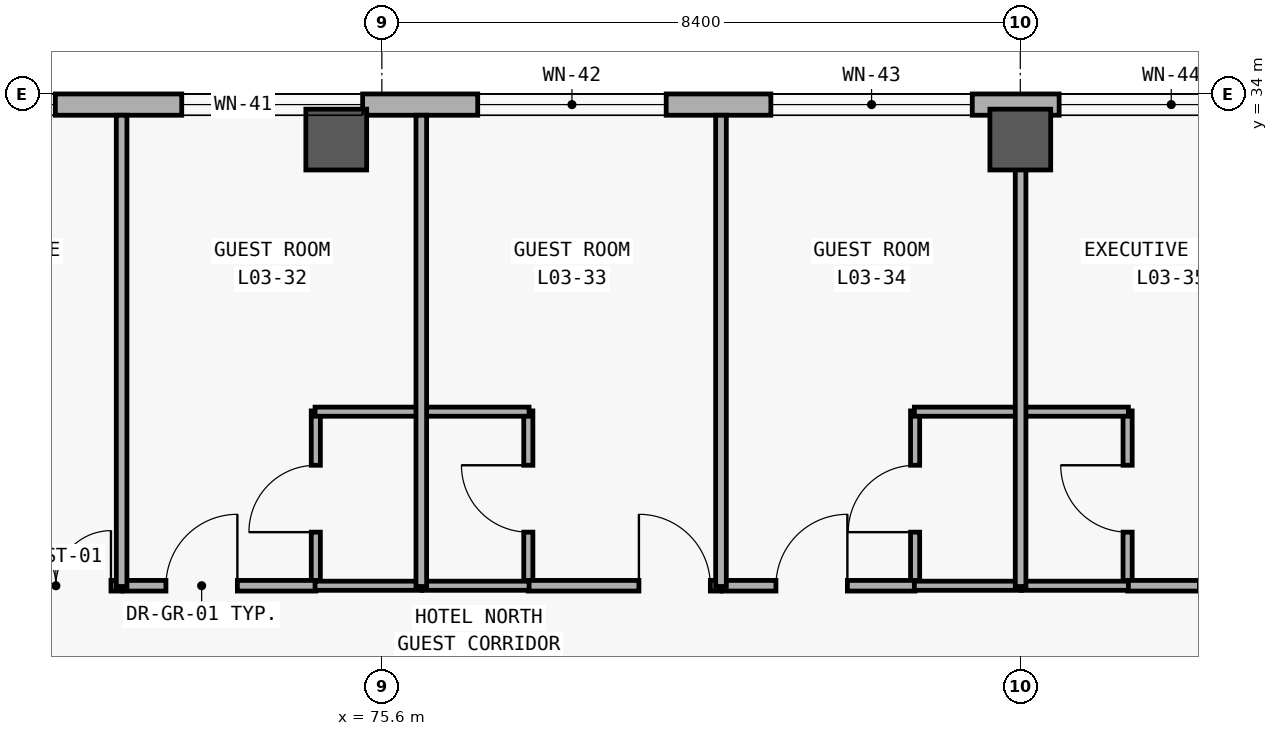
"""IFC4 building model, lengths in metres.
Left out: names, types, materials, properties, quantities, classifications, styles, units other than length and angle.
Written with IfcOpenShell. Run it as: python <this file> out.ifc"""

import sys

from ifc_helpers import new_model, si_unit, direction, frame, frame_2d, origin, origin_2d, place, context, subcontext, project, spatial, rectangle, extrude, element, fill, save


model = new_model("IFC4")
c1 = context("Model", 3, precision=1e-05, world=origin(), true_north=direction((0.0, 1.0)))
c2 = subcontext(c1, "Body", "Model", "MODEL_VIEW")
j1 = project(units=[si_unit("LENGTHUNIT", "METRE"), si_unit("PLANEANGLEUNIT", "RADIAN")], contexts=[c1])
p1 = place(None, origin())
s1 = spatial("IfcSite", under=j1, at=p1, CompositionType="ELEMENT")
p2 = place(p1, origin())
s2 = spatial("IfcBuilding", under=s1, at=p2, CompositionType="ELEMENT")
p3 = place(p2, frame((0.0, 0.0, 15.0)))
s3 = spatial("IfcBuildingStorey", under=s2, at=p3, CompositionType="ELEMENT", Elevation=15.0)
for number, where, z_axis, x_axis in (
    (1, (75.0, 33.4, 0.0), (0.0, 0.0, 1.0), (1.0, 0.0, 0.0)),
    (2, (84.0, 33.4, 0.0), (0.0, 0.0, 1.0), (1.0, 0.0, 0.0)),
):
    element("IfcColumn", number, at=place(p3, frame(where, z_axis=z_axis, x_axis=x_axis)), inside=s3, PredefinedType="COLUMN", context=c2, shape_type="SweptSolid", body=[
        extrude(rectangle(XDim=0.8, YDim=0.8, at=origin_2d()), origin(), (0.0, 0.0, 1.0), 4.2),
    ])
p4 = place(p3, frame((8.68, 33.86, 0.0), z_axis=(0.0, 0.0, 1.0), x_axis=(1.0, 0.0, 0.0)))
e3 = element("IfcWall", 3, at=p4, inside=s3, PredefinedType="SOLIDWALL", context=c2, shape_type="SweptSolid", body=[
    extrude(rectangle(XDim=83.44, YDim=0.28, at=frame_2d((41.72, 0.0))), origin(), (0.0, 0.0, 1.0), 3.92),
])
p5 = place(p4, frame((4.895, 0.0, 0.85)))
e4 = element("IfcOpeningElement", 4, at=p5, cuts=e3, PredefinedType="OPENING", context=c2, shape_type="SweptSolid", body=[
    extrude(rectangle(XDim=2.6, YDim=2.2, at=frame_2d((1.3, 1.1))), frame((0.0, 0.15, 0.0), z_axis=(0.0, -1.0, 0.0), x_axis=(1.0, 0.0, 0.0)), (0.0, 0.0, 1.0), 0.3),
])
p6 = place(p4, frame((13.371, 0.0, 0.85)))
e5 = element("IfcOpeningElement", 5, at=p6, cuts=e3, PredefinedType="OPENING", context=c2, shape_type="SweptSolid", body=[
    extrude(rectangle(XDim=1.7, YDim=2.0, at=frame_2d((0.85, 1.0))), frame((0.0, 0.15, 0.0), z_axis=(0.0, -1.0, 0.0), x_axis=(1.0, 0.0, 0.0)), (0.0, 0.0, 1.0), 0.3),
])
p7 = place(p4, frame((17.015, 0.0, 0.85)))
e6 = element("IfcOpeningElement", 6, at=p7, cuts=e3, PredefinedType="OPENING", context=c2, shape_type="SweptSolid", body=[
    extrude(rectangle(XDim=2.3, YDim=2.05, at=frame_2d((1.15, 1.025))), frame((0.0, 0.15, 0.0), z_axis=(0.0, -1.0, 0.0), x_axis=(1.0, 0.0, 0.0)), (0.0, 0.0, 1.0), 0.3),
])
p8 = place(p4, frame((20.732, 0.0, 0.85)))
e7 = element("IfcOpeningElement", 7, at=p8, cuts=e3, PredefinedType="OPENING", context=c2, shape_type="SweptSolid", body=[
    extrude(rectangle(XDim=2.75, YDim=2.1, at=frame_2d((1.375, 1.05))), frame((0.0, 0.15, 0.0), z_axis=(0.0, -1.0, 0.0), x_axis=(1.0, 0.0, 0.0)), (0.0, 0.0, 1.0), 0.3),
])
p9 = place(p4, frame((25.46, 0.0, 0.85)))
e8 = element("IfcOpeningElement", 8, at=p9, cuts=e3, PredefinedType="OPENING", context=c2, shape_type="SweptSolid", body=[
    extrude(rectangle(XDim=1.18, YDim=1.5, at=frame_2d((0.59, 0.75))), frame((0.0, 0.15, 0.0), z_axis=(0.0, -1.0, 0.0), x_axis=(1.0, 0.0, 0.0)), (0.0, 0.0, 1.0), 0.3),
])
p10 = place(p4, frame((29.352, 0.0, 0.85)))
e9 = element("IfcOpeningElement", 9, at=p10, cuts=e3, PredefinedType="OPENING", context=c2, shape_type="SweptSolid", body=[
    extrude(rectangle(XDim=1.28, YDim=1.6, at=frame_2d((0.64, 0.8))), frame((0.0, 0.15, 0.0), z_axis=(0.0, -1.0, 0.0), x_axis=(1.0, 0.0, 0.0)), (0.0, 0.0, 1.0), 0.3),
])
p11 = place(p4, frame((33.245, 0.0, 0.85)))
e10 = element("IfcOpeningElement", 10, at=p11, cuts=e3, PredefinedType="OPENING", context=c2, shape_type="SweptSolid", body=[
    extrude(rectangle(XDim=1.38, YDim=1.7, at=frame_2d((0.69, 0.85))), frame((0.0, 0.15, 0.0), z_axis=(0.0, -1.0, 0.0), x_axis=(1.0, 0.0, 0.0)), (0.0, 0.0, 1.0), 0.3),
])
p12 = place(p4, frame((37.138, 0.0, 0.85)))
e11 = element("IfcOpeningElement", 11, at=p12, cuts=e3, PredefinedType="OPENING", context=c2, shape_type="SweptSolid", body=[
    extrude(rectangle(XDim=1.48, YDim=1.8, at=frame_2d((0.74, 0.9))), frame((0.0, 0.15, 0.0), z_axis=(0.0, -1.0, 0.0), x_axis=(1.0, 0.0, 0.0)), (0.0, 0.0, 1.0), 0.3),
])
p13 = place(p4, frame((41.031, 0.0, 0.85)))
e12 = element("IfcOpeningElement", 12, at=p13, cuts=e3, PredefinedType="OPENING", context=c2, shape_type="SweptSolid", body=[
    extrude(rectangle(XDim=1.58, YDim=1.85, at=frame_2d((0.79, 0.925))), frame((0.0, 0.15, 0.0), z_axis=(0.0, -1.0, 0.0), x_axis=(1.0, 0.0, 0.0)), (0.0, 0.0, 1.0), 0.3),
])
p14 = place(p4, frame((44.923, 0.0, 0.85)))
e13 = element("IfcOpeningElement", 13, at=p14, cuts=e3, PredefinedType="OPENING", context=c2, shape_type="SweptSolid", body=[
    extrude(rectangle(XDim=1.68, YDim=1.9, at=frame_2d((0.84, 0.95))), frame((0.0, 0.15, 0.0), z_axis=(0.0, -1.0, 0.0), x_axis=(1.0, 0.0, 0.0)), (0.0, 0.0, 1.0), 0.3),
])
p15 = place(p4, frame((48.816, 0.0, 0.85)))
e14 = element("IfcOpeningElement", 14, at=p15, cuts=e3, PredefinedType="OPENING", context=c2, shape_type="SweptSolid", body=[
    extrude(rectangle(XDim=1.78, YDim=1.95, at=frame_2d((0.89, 0.975))), frame((0.0, 0.15, 0.0), z_axis=(0.0, -1.0, 0.0), x_axis=(1.0, 0.0, 0.0)), (0.0, 0.0, 1.0), 0.3),
])
p16 = place(p4, frame((52.71, 0.0, 0.85)))
e15 = element("IfcOpeningElement", 15, at=p16, cuts=e3, PredefinedType="OPENING", context=c2, shape_type="SweptSolid", body=[
    extrude(rectangle(XDim=1.88, YDim=1.95, at=frame_2d((0.94, 0.975))), frame((0.0, 0.15, 0.0), z_axis=(0.0, -1.0, 0.0), x_axis=(1.0, 0.0, 0.0)), (0.0, 0.0, 1.0), 0.3),
])
p17 = place(p4, frame((56.567, 0.0, 0.85)))
e16 = element("IfcOpeningElement", 16, at=p17, cuts=e3, PredefinedType="OPENING", context=c2, shape_type="SweptSolid", body=[
    extrude(rectangle(XDim=2.05, YDim=1.95, at=frame_2d((1.025, 0.975))), frame((0.0, 0.15, 0.0), z_axis=(0.0, -1.0, 0.0), x_axis=(1.0, 0.0, 0.0)), (0.0, 0.0, 1.0), 0.3),
])
p18 = place(p4, frame((60.444, 0.0, 0.85)))
e17 = element("IfcOpeningElement", 17, at=p18, cuts=e3, PredefinedType="OPENING", context=c2, shape_type="SweptSolid", body=[
    extrude(rectangle(XDim=2.18, YDim=1.95, at=frame_2d((1.09, 0.975))), frame((0.0, 0.15, 0.0), z_axis=(0.0, -1.0, 0.0), x_axis=(1.0, 0.0, 0.0)), (0.0, 0.0, 1.0), 0.3),
])
p19 = place(p4, frame((64.287, 0.0, 0.85)))
e18 = element("IfcOpeningElement", 18, at=p19, cuts=e3, PredefinedType="OPENING", context=c2, shape_type="SweptSolid", body=[
    extrude(rectangle(XDim=2.38, YDim=1.95, at=frame_2d((1.19, 0.975))), frame((0.0, 0.15, 0.0), z_axis=(0.0, -1.0, 0.0), x_axis=(1.0, 0.0, 0.0)), (0.0, 0.0, 1.0), 0.3),
])
p20 = place(p4, frame((68.181, 0.0, 0.85)))
e19 = element("IfcOpeningElement", 19, at=p20, cuts=e3, PredefinedType="OPENING", context=c2, shape_type="SweptSolid", body=[
    extrude(rectangle(XDim=2.48, YDim=2.0, at=frame_2d((1.24, 1.0))), frame((0.0, 0.15, 0.0), z_axis=(0.0, -1.0, 0.0), x_axis=(1.0, 0.0, 0.0)), (0.0, 0.0, 1.0), 0.3),
])
p21 = place(p4, frame((72.038, 0.0, 0.85)))
e20 = element("IfcOpeningElement", 20, at=p21, cuts=e3, PredefinedType="OPENING", context=c2, shape_type="SweptSolid", body=[
    extrude(rectangle(XDim=2.65, YDim=2.0, at=frame_2d((1.325, 1.0))), frame((0.0, 0.15, 0.0), z_axis=(0.0, -1.0, 0.0), x_axis=(1.0, 0.0, 0.0)), (0.0, 0.0, 1.0), 0.3),
])
p22 = place(p4, frame((75.831, 0.0, 0.85)))
e21 = element("IfcOpeningElement", 21, at=p22, cuts=e3, PredefinedType="OPENING", context=c2, shape_type="SweptSolid", body=[
    extrude(rectangle(XDim=2.95, YDim=2.05, at=frame_2d((1.475, 1.025))), frame((0.0, 0.15, 0.0), z_axis=(0.0, -1.0, 0.0), x_axis=(1.0, 0.0, 0.0)), (0.0, 0.0, 1.0), 0.3),
])
p23 = place(p4, frame((80.349, 0.0, 0.85)))
e22 = element("IfcOpeningElement", 22, at=p23, cuts=e3, PredefinedType="OPENING", context=c2, shape_type="SweptSolid", body=[
    extrude(rectangle(XDim=1.8, YDim=1.8, at=frame_2d((0.9, 0.9))), frame((0.0, 0.15, 0.0), z_axis=(0.0, -1.0, 0.0), x_axis=(1.0, 0.0, 0.0)), (0.0, 0.0, 1.0), 0.3),
])
p24 = place(p3, frame((74.731, 27.52, 0.0), z_axis=(0.0, 0.0, 1.0), x_axis=(0.0, 1.0, 0.0)))
e23 = element("IfcWall", 23, at=p24, inside=s3, PredefinedType="PARTITIONING", context=c2, shape_type="SweptSolid", body=[
    extrude(rectangle(XDim=2.31, YDim=0.12, at=frame_2d((1.155, 0.0))), origin(), (0.0, 0.0, 1.0), 3.02),
])
p25 = place(p24, frame((0.715, 0.0, 0.0)))
e24 = element("IfcOpeningElement", 24, at=p25, cuts=e23, PredefinedType="OPENING", context=c2, shape_type="SweptSolid", body=[
    extrude(rectangle(XDim=0.88, YDim=2.15, at=frame_2d((0.44, 1.075))), frame((0.0, 0.07, 0.0), z_axis=(0.0, -1.0, 0.0), x_axis=(1.0, 0.0, 0.0)), (0.0, 0.0, 1.0), 0.14),
])
p26 = place(p3, frame((77.527, 27.52, 0.0), z_axis=(0.0, 0.0, 1.0), x_axis=(0.0, 1.0, 0.0)))
e25 = element("IfcWall", 25, at=p26, inside=s3, PredefinedType="PARTITIONING", context=c2, shape_type="SweptSolid", body=[
    extrude(rectangle(XDim=2.31, YDim=0.12, at=frame_2d((1.155, 0.0))), origin(), (0.0, 0.0, 1.0), 3.02),
])
p27 = place(p26, frame((0.715, 0.0, 0.0)))
e26 = element("IfcOpeningElement", 26, at=p27, cuts=e25, PredefinedType="OPENING", context=c2, shape_type="SweptSolid", body=[
    extrude(rectangle(XDim=0.88, YDim=2.15, at=frame_2d((0.44, 1.075))), frame((0.0, 0.07, 0.0), z_axis=(0.0, -1.0, 0.0), x_axis=(1.0, 0.0, 0.0)), (0.0, 0.0, 1.0), 0.14),
])
p28 = place(p3, frame((82.616, 27.52, 0.0), z_axis=(0.0, 0.0, 1.0), x_axis=(0.0, 1.0, 0.0)))
e27 = element("IfcWall", 27, at=p28, inside=s3, PredefinedType="PARTITIONING", context=c2, shape_type="SweptSolid", body=[
    extrude(rectangle(XDim=2.31, YDim=0.12, at=frame_2d((1.155, 0.0))), origin(), (0.0, 0.0, 1.0), 3.02),
])
p29 = place(p28, frame((0.715, 0.0, 0.0)))
e28 = element("IfcOpeningElement", 28, at=p29, cuts=e27, PredefinedType="OPENING", context=c2, shape_type="SweptSolid", body=[
    extrude(rectangle(XDim=0.88, YDim=2.15, at=frame_2d((0.44, 1.075))), frame((0.0, 0.07, 0.0), z_axis=(0.0, -1.0, 0.0), x_axis=(1.0, 0.0, 0.0)), (0.0, 0.0, 1.0), 0.14),
])
p30 = place(p3, frame((85.412, 27.52, 0.0), z_axis=(0.0, 0.0, 1.0), x_axis=(0.0, 1.0, 0.0)))
e29 = element("IfcWall", 29, at=p30, inside=s3, PredefinedType="PARTITIONING", context=c2, shape_type="SweptSolid", body=[
    extrude(rectangle(XDim=2.31, YDim=0.12, at=frame_2d((1.155, 0.0))), origin(), (0.0, 0.0, 1.0), 3.02),
])
p31 = place(p30, frame((0.715, 0.0, 0.0)))
e30 = element("IfcOpeningElement", 30, at=p31, cuts=e29, PredefinedType="OPENING", context=c2, shape_type="SweptSolid", body=[
    extrude(rectangle(XDim=0.88, YDim=2.15, at=frame_2d((0.44, 1.075))), frame((0.0, 0.07, 0.0), z_axis=(0.0, -1.0, 0.0), x_axis=(1.0, 0.0, 0.0)), (0.0, 0.0, 1.0), 0.14),
])
p32 = place(p3, frame((69.641, 27.53, 0.0), z_axis=(0.0, 0.0, 1.0), x_axis=(1.0, 0.0, 0.0)))
e31 = element("IfcWall", 31, at=p32, inside=s3, PredefinedType="PARTITIONING", context=c2, shape_type="SweptSolid", body=[
    extrude(rectangle(XDim=2.535, YDim=0.14, at=frame_2d((1.268, 0.0))), origin(), (0.0, 0.0, 1.0), 3.02),
])
p33 = place(p32, frame((0.945, 0.0, 0.0)))
e32 = element("IfcOpeningElement", 32, at=p33, cuts=e31, PredefinedType="OPENING", context=c2, shape_type="SweptSolid", body=[
    extrude(rectangle(XDim=1.45, YDim=2.3, at=frame_2d((0.725, 1.15))), frame((0.0, 0.08, 0.0), z_axis=(0.0, -1.0, 0.0), x_axis=(1.0, 0.0, 0.0)), (0.0, 0.0, 1.0), 0.16),
])
p34 = place(p3, frame((72.196, 27.53, 0.0), z_axis=(0.0, 0.0, 1.0), x_axis=(1.0, 0.0, 0.0)))
e33 = element("IfcWall", 33, at=p34, inside=s3, PredefinedType="PARTITIONING", context=c2, shape_type="SweptSolid", body=[
    extrude(rectangle(XDim=2.535, YDim=0.14, at=frame_2d((1.268, 0.0))), origin(), (0.0, 0.0, 1.0), 3.02),
])
p35 = place(p34, frame((0.563, 0.0, 0.0)))
e34 = element("IfcOpeningElement", 34, at=p35, cuts=e33, PredefinedType="OPENING", context=c2, shape_type="SweptSolid", body=[
    extrude(rectangle(XDim=0.94, YDim=2.2, at=frame_2d((0.47, 1.1))), frame((0.0, 0.08, 0.0), z_axis=(0.0, -1.0, 0.0), x_axis=(1.0, 0.0, 0.0)), (0.0, 0.0, 1.0), 0.16),
])
p36 = place(p3, frame((77.527, 27.53, 0.0), z_axis=(0.0, 0.0, 1.0), x_axis=(1.0, 0.0, 0.0)))
e35 = element("IfcWall", 35, at=p36, inside=s3, PredefinedType="PARTITIONING", context=c2, shape_type="SweptSolid", body=[
    extrude(rectangle(XDim=2.535, YDim=0.14, at=frame_2d((1.268, 0.0))), origin(), (0.0, 0.0, 1.0), 3.02),
])
p37 = place(p36, frame((1.455, 0.0, 0.0)))
e36 = element("IfcOpeningElement", 36, at=p37, cuts=e35, PredefinedType="OPENING", context=c2, shape_type="SweptSolid", body=[
    extrude(rectangle(XDim=0.94, YDim=2.2, at=frame_2d((0.47, 1.1))), frame((0.0, 0.08, 0.0), z_axis=(0.0, -1.0, 0.0), x_axis=(1.0, 0.0, 0.0)), (0.0, 0.0, 1.0), 0.16),
])
p38 = place(p3, frame((80.082, 27.53, 0.0), z_axis=(0.0, 0.0, 1.0), x_axis=(1.0, 0.0, 0.0)))
e37 = element("IfcWall", 37, at=p38, inside=s3, PredefinedType="PARTITIONING", context=c2, shape_type="SweptSolid", body=[
    extrude(rectangle(XDim=2.534, YDim=0.14, at=frame_2d((1.267, 0.0))), origin(), (0.0, 0.0, 1.0), 3.02),
])
p39 = place(p38, frame((0.703, 0.0, 0.0)))
e38 = element("IfcOpeningElement", 38, at=p39, cuts=e37, PredefinedType="OPENING", context=c2, shape_type="SweptSolid", body=[
    extrude(rectangle(XDim=0.94, YDim=2.2, at=frame_2d((0.47, 1.1))), frame((0.0, 0.08, 0.0), z_axis=(0.0, -1.0, 0.0), x_axis=(1.0, 0.0, 0.0)), (0.0, 0.0, 1.0), 0.16),
])
p40 = place(p3, frame((85.412, 27.53, 0.0), z_axis=(0.0, 0.0, 1.0), x_axis=(1.0, 0.0, 0.0)))
e39 = element("IfcWall", 39, at=p40, inside=s3, PredefinedType="PARTITIONING", context=c2, shape_type="SweptSolid", body=[
    extrude(rectangle(XDim=2.535, YDim=0.14, at=frame_2d((1.268, 0.0))), origin(), (0.0, 0.0, 1.0), 3.02),
])
p41 = place(p40, frame((0.945, 0.0, 0.0)))
e40 = element("IfcOpeningElement", 40, at=p41, cuts=e39, PredefinedType="OPENING", context=c2, shape_type="SweptSolid", body=[
    extrude(rectangle(XDim=1.45, YDim=2.3, at=frame_2d((0.725, 1.15))), frame((0.0, 0.08, 0.0), z_axis=(0.0, -1.0, 0.0), x_axis=(1.0, 0.0, 0.0)), (0.0, 0.0, 1.0), 0.16),
])
for number, where, z_axis, x_axis in (
    (41, (74.721, 27.53, 0.0), (0.0, 0.0, 1.0), (1.0, 0.0, 0.0)),
    (42, (74.721, 29.82, 0.0), (0.0, 0.0, 1.0), (1.0, 0.0, 0.0)),
):
    element("IfcWall", number, at=place(p3, frame(where, z_axis=z_axis, x_axis=x_axis)), inside=s3, PredefinedType="PARTITIONING", context=c2, shape_type="SweptSolid", body=[
        extrude(rectangle(XDim=1.408, YDim=0.12, at=frame_2d((0.704, 0.0))), origin(), (0.0, 0.0, 1.0), 3.02),
    ])
for number, where, z_axis, x_axis in (
    (43, (76.129, 27.53, 0.0), (0.0, 0.0, 1.0), (1.0, 0.0, 0.0)),
    (44, (76.129, 29.82, 0.0), (0.0, 0.0, 1.0), (1.0, 0.0, 0.0)),
):
    element("IfcWall", number, at=place(p3, frame(where, z_axis=z_axis, x_axis=x_axis)), inside=s3, PredefinedType="PARTITIONING", context=c2, shape_type="SweptSolid", body=[
        extrude(rectangle(XDim=1.408, YDim=0.12, at=frame_2d((0.704, 0.0))), origin(), (0.0, 0.0, 1.0), 3.02),
    ])
for number, where, z_axis, x_axis in (
    (45, (82.606, 27.53, 0.0), (0.0, 0.0, 1.0), (1.0, 0.0, 0.0)),
    (46, (82.606, 29.82, 0.0), (0.0, 0.0, 1.0), (1.0, 0.0, 0.0)),
):
    element("IfcWall", number, at=place(p3, frame(where, z_axis=z_axis, x_axis=x_axis)), inside=s3, PredefinedType="PARTITIONING", context=c2, shape_type="SweptSolid", body=[
        extrude(rectangle(XDim=1.408, YDim=0.12, at=frame_2d((0.704, 0.0))), origin(), (0.0, 0.0, 1.0), 3.02),
    ])
for number, where, z_axis, x_axis in (
    (47, (84.014, 27.53, 0.0), (0.0, 0.0, 1.0), (1.0, 0.0, 0.0)),
    (48, (84.014, 29.82, 0.0), (0.0, 0.0, 1.0), (1.0, 0.0, 0.0)),
):
    element("IfcWall", number, at=place(p3, frame(where, z_axis=z_axis, x_axis=x_axis)), inside=s3, PredefinedType="PARTITIONING", context=c2, shape_type="SweptSolid", body=[
        extrude(rectangle(XDim=1.408, YDim=0.12, at=frame_2d((0.704, 0.0))), origin(), (0.0, 0.0, 1.0), 3.02),
    ])
for number, where, z_axis, x_axis in (
    (49, (72.176, 27.52, 0.0), (0.0, 0.0, 1.0), (0.0, 1.0, 0.0)),
    (50, (76.119, 27.52, 0.0), (0.0, 0.0, 1.0), (0.0, 1.0, 0.0)),
    (51, (80.062, 27.52, 0.0), (0.0, 0.0, 1.0), (0.0, 1.0, 0.0)),
    (52, (84.004, 27.52, 0.0), (0.0, 0.0, 1.0), (0.0, 1.0, 0.0)),
):
    element("IfcWall", number, at=place(p3, frame(where, z_axis=z_axis, x_axis=x_axis)), inside=s3, PredefinedType="PARTITIONING", context=c2, shape_type="SweptSolid", body=[
        extrude(rectangle(XDim=6.2, YDim=0.14, at=frame_2d((3.1, 0.0))), origin(), (0.0, 0.0, 1.0), 3.02),
    ])
p42 = place(p18, origin())
e53 = element("IfcWindow", 53, at=p42, inside=s3, PartitioningType="SINGLE_PANEL", PredefinedType="WINDOW", context=c2, shape_type="SweptSolid", body=[
    extrude(rectangle(XDim=2.18, YDim=1.95, at=frame_2d((1.09, 0.975))), frame((0.0, 0.03, 0.0), z_axis=(0.0, -1.0, 0.0), x_axis=(1.0, 0.0, 0.0)), (0.0, 0.0, 1.0), 0.06),
])
fill(e17, e53)
p43 = place(p19, origin())
e54 = element("IfcWindow", 54, at=p43, inside=s3, PartitioningType="SINGLE_PANEL", PredefinedType="WINDOW", context=c2, shape_type="SweptSolid", body=[
    extrude(rectangle(XDim=2.38, YDim=1.95, at=frame_2d((1.19, 0.975))), frame((0.0, 0.03, 0.0), z_axis=(0.0, -1.0, 0.0), x_axis=(1.0, 0.0, 0.0)), (0.0, 0.0, 1.0), 0.06),
])
fill(e18, e54)
p44 = place(p20, origin())
e55 = element("IfcWindow", 55, at=p44, inside=s3, PartitioningType="SINGLE_PANEL", PredefinedType="WINDOW", context=c2, shape_type="SweptSolid", body=[
    extrude(rectangle(XDim=2.48, YDim=2.0, at=frame_2d((1.24, 1.0))), frame((0.0, 0.03, 0.0), z_axis=(0.0, -1.0, 0.0), x_axis=(1.0, 0.0, 0.0)), (0.0, 0.0, 1.0), 0.06),
])
fill(e19, e55)
p45 = place(p21, origin())
e56 = element("IfcWindow", 56, at=p45, inside=s3, PartitioningType="SINGLE_PANEL", PredefinedType="WINDOW", context=c2, shape_type="SweptSolid", body=[
    extrude(rectangle(XDim=2.65, YDim=2.0, at=frame_2d((1.325, 1.0))), frame((0.0, 0.03, 0.0), z_axis=(0.0, -1.0, 0.0), x_axis=(1.0, 0.0, 0.0)), (0.0, 0.0, 1.0), 0.06),
])
fill(e20, e56)
p46 = place(p22, origin())
e57 = element("IfcWindow", 57, at=p46, inside=s3, PartitioningType="SINGLE_PANEL", PredefinedType="WINDOW", context=c2, shape_type="SweptSolid", body=[
    extrude(rectangle(XDim=2.95, YDim=2.05, at=frame_2d((1.475, 1.025))), frame((0.0, 0.03, 0.0), z_axis=(0.0, -1.0, 0.0), x_axis=(1.0, 0.0, 0.0)), (0.0, 0.0, 1.0), 0.06),
])
fill(e21, e57)
p47 = place(p25, origin())
e58 = element("IfcDoor", 58, at=p47, inside=s3, OperationType="SINGLE_SWING_LEFT", PredefinedType="DOOR", context=c2, shape_type="SweptSolid", body=[
    extrude(rectangle(XDim=0.88, YDim=2.15, at=frame_2d((0.44, 1.075))), frame((0.0, 0.025, 0.0), z_axis=(0.0, -1.0, 0.0), x_axis=(1.0, 0.0, 0.0)), (0.0, 0.0, 1.0), 0.05),
])
fill(e24, e58)
p48 = place(p27, origin())
e59 = element("IfcDoor", 59, at=p48, inside=s3, OperationType="SINGLE_SWING_RIGHT", PredefinedType="DOOR", context=c2, shape_type="SweptSolid", body=[
    extrude(rectangle(XDim=0.88, YDim=2.15, at=frame_2d((0.44, 1.075))), frame((0.0, 0.025, 0.0), z_axis=(0.0, -1.0, 0.0), x_axis=(1.0, 0.0, 0.0)), (0.0, 0.0, 1.0), 0.05),
])
fill(e26, e59)
p49 = place(p29, origin())
e60 = element("IfcDoor", 60, at=p49, inside=s3, OperationType="SINGLE_SWING_LEFT", PredefinedType="DOOR", context=c2, shape_type="SweptSolid", body=[
    extrude(rectangle(XDim=0.88, YDim=2.15, at=frame_2d((0.44, 1.075))), frame((0.0, 0.025, 0.0), z_axis=(0.0, -1.0, 0.0), x_axis=(1.0, 0.0, 0.0)), (0.0, 0.0, 1.0), 0.05),
])
fill(e28, e60)
p50 = place(p31, origin())
e61 = element("IfcDoor", 61, at=p50, inside=s3, OperationType="SINGLE_SWING_RIGHT", PredefinedType="DOOR", context=c2, shape_type="SweptSolid", body=[
    extrude(rectangle(XDim=0.88, YDim=2.15, at=frame_2d((0.44, 1.075))), frame((0.0, 0.025, 0.0), z_axis=(0.0, -1.0, 0.0), x_axis=(1.0, 0.0, 0.0)), (0.0, 0.0, 1.0), 0.05),
])
fill(e30, e61)
p51 = place(p33, origin())
e62 = element("IfcDoor", 62, at=p51, inside=s3, OperationType="DOUBLE_DOOR_SINGLE_SWING", PredefinedType="DOOR", context=c2, shape_type="SweptSolid", body=[
    extrude(rectangle(XDim=1.45, YDim=2.3, at=frame_2d((0.725, 1.15))), frame((0.0, 0.025, 0.0), z_axis=(0.0, -1.0, 0.0), x_axis=(1.0, 0.0, 0.0)), (0.0, 0.0, 1.0), 0.05),
])
fill(e32, e62)
p52 = place(p35, origin())
e63 = element("IfcDoor", 63, at=p52, inside=s3, OperationType="SINGLE_SWING_RIGHT", PredefinedType="DOOR", context=c2, shape_type="SweptSolid", body=[
    extrude(rectangle(XDim=0.94, YDim=2.2, at=frame_2d((0.47, 1.1))), frame((0.0, 0.025, 0.0), z_axis=(0.0, -1.0, 0.0), x_axis=(1.0, 0.0, 0.0)), (0.0, 0.0, 1.0), 0.05),
])
fill(e34, e63)
p53 = place(p37, origin())
e64 = element("IfcDoor", 64, at=p53, inside=s3, OperationType="SINGLE_SWING_LEFT", PredefinedType="DOOR", context=c2, shape_type="SweptSolid", body=[
    extrude(rectangle(XDim=0.94, YDim=2.2, at=frame_2d((0.47, 1.1))), frame((0.0, 0.025, 0.0), z_axis=(0.0, -1.0, 0.0), x_axis=(1.0, 0.0, 0.0)), (0.0, 0.0, 1.0), 0.05),
])
fill(e36, e64)
p54 = place(p39, origin())
e65 = element("IfcDoor", 65, at=p54, inside=s3, OperationType="SINGLE_SWING_RIGHT", PredefinedType="DOOR", context=c2, shape_type="SweptSolid", body=[
    extrude(rectangle(XDim=0.94, YDim=2.2, at=frame_2d((0.47, 1.1))), frame((0.0, 0.025, 0.0), z_axis=(0.0, -1.0, 0.0), x_axis=(1.0, 0.0, 0.0)), (0.0, 0.0, 1.0), 0.05),
])
fill(e38, e65)
save(model, sys.argv[1])
